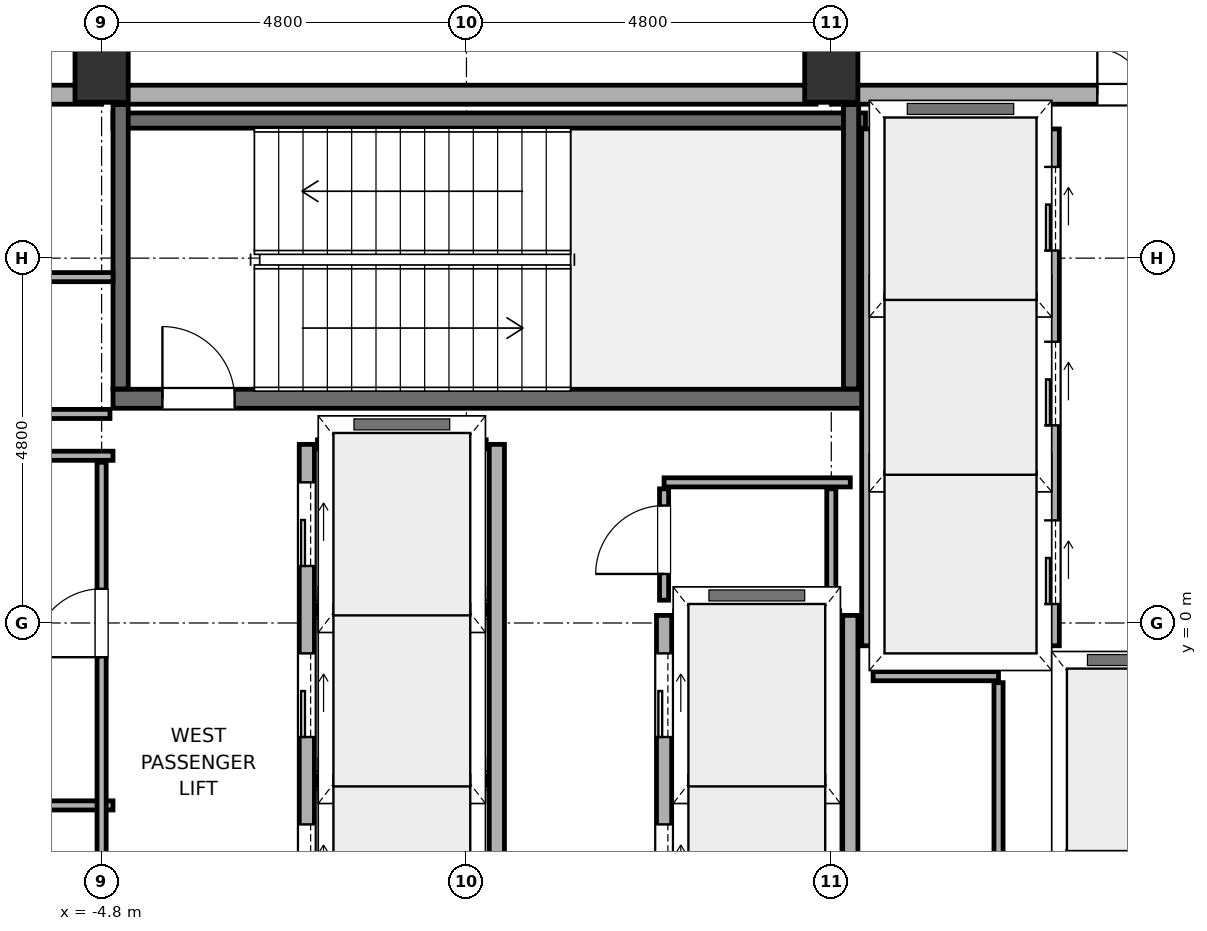
"""IFC4 building model, lengths in metres.
Left out: names, types, materials, properties, quantities, classifications, styles, units other than length and angle.
Written with IfcOpenShell. Run it as: python <this file> out.ifc"""

import sys

from ifc_helpers import new_model, si_unit, direction, frame, frame_2d, origin, origin_2d, place, context, subcontext, project, spatial, rectangle, hollow_rectangle, extrude, element, fill, save


model = new_model("IFC4")
c1 = context("Model", 3, precision=1e-05, world=origin(), true_north=direction((0.0, 1.0)))
c2 = subcontext(c1, "Body", "Model", "MODEL_VIEW")
j1 = project(units=[si_unit("LENGTHUNIT", "METRE"), si_unit("PLANEANGLEUNIT", "RADIAN")], contexts=[c1])
p1 = place(None, origin())
s1 = spatial("IfcSite", under=j1, at=p1, CompositionType="ELEMENT")
p2 = place(p1, origin())
s2 = spatial("IfcBuilding", under=s1, at=p2, CompositionType="ELEMENT")
p3 = place(p2, frame((0.0, 0.0, 180.3)))
s3 = spatial("IfcBuildingStorey", under=s2, at=p3, CompositionType="ELEMENT", Elevation=180.3)
for number, where, z_axis, x_axis in (
    (1, (-4.8, 7.2, 0.0), (0.0, 0.0, 1.0), (1.0, 0.0, 0.0)),
    (2, (4.8, 7.2, 0.0), (0.0, 0.0, 1.0), (1.0, 0.0, 0.0)),
):
    element("IfcColumn", number, at=place(p3, frame(where, z_axis=z_axis, x_axis=x_axis)), inside=s3, PredefinedType="COLUMN", context=c2, shape_type="SweptSolid", body=[
        extrude(hollow_rectangle(XDim=0.7, YDim=0.7, WallThickness=0.032, at=origin_2d()), origin(), (0.0, 0.0, 1.0), 5.2),
    ])
p4 = place(p3, frame((-14.2, 6.95, 0.0), z_axis=(0.0, 0.0, 1.0), x_axis=(1.0, 0.0, 0.0)))
e3 = element("IfcWall", 3, at=p4, inside=s3, PredefinedType="SOLIDWALL", context=c2, shape_type="SweptSolid", body=[
    extrude(rectangle(XDim=9.4, YDim=0.25, at=frame_2d((4.7, 0.0))), origin(), (0.0, 0.0, 1.0), 3.55),
])
p5 = place(p4, frame((4.9, 0.0, 0.0)))
e4 = element("IfcOpeningElement", 4, at=p5, cuts=e3, PredefinedType="OPENING", context=c2, shape_type="SweptSolid", body=[
    extrude(rectangle(XDim=1.0, YDim=2.15, at=frame_2d((0.5, 1.075))), frame((0.0, 0.14, 0.0), z_axis=(0.0, -1.0, 0.0), x_axis=(1.0, 0.0, 0.0)), (0.0, 0.0, 1.0), 0.28),
])
p6 = place(p3, frame((-4.6, 6.95, 0.0), z_axis=(0.0, 0.0, 1.0), x_axis=(1.0, 0.0, 0.0)))
e5 = element("IfcWall", 5, at=p6, inside=s3, PredefinedType="SOLIDWALL", context=c2, shape_type="SweptSolid", body=[
    extrude(rectangle(XDim=9.2, YDim=0.25, at=frame_2d((4.6, 0.0))), origin(), (0.0, 0.0, 1.0), 3.55),
])
p7 = place(p3, frame((4.8, 6.95, 0.0), z_axis=(0.0, 0.0, 1.0), x_axis=(1.0, 0.0, 0.0)))
e6 = element("IfcWall", 6, at=p7, inside=s3, PredefinedType="SOLIDWALL", context=c2, shape_type="SweptSolid", body=[
    extrude(rectangle(XDim=9.4, YDim=0.25, at=frame_2d((4.7, 0.0))), origin(), (0.0, 0.0, 1.0), 3.55),
])
p8 = place(p7, frame((3.5, 0.0, 0.0)))
e7 = element("IfcOpeningElement", 7, at=p8, cuts=e6, PredefinedType="OPENING", context=c2, shape_type="SweptSolid", body=[
    extrude(rectangle(XDim=1.2, YDim=2.2, at=frame_2d((0.6, 1.1))), frame((0.0, 0.14, 0.0), z_axis=(0.0, -1.0, 0.0), x_axis=(1.0, 0.0, 0.0)), (0.0, 0.0, 1.0), 0.28),
])
p9 = place(p3, frame((-4.65, 2.95, -0.22), z_axis=(0.0, 0.0, 1.0), x_axis=(1.0, 0.0, 0.0)))
e8 = element("IfcWall", 8, at=p9, inside=s3, PredefinedType="SOLIDWALL", context=c2, shape_type="SweptSolid", body=[
    extrude(rectangle(XDim=9.9, YDim=0.25, at=frame_2d((4.95, 0.0))), origin(), (0.0, 0.0, 1.0), 5.17),
])
p10 = place(p9, frame((0.65, 0.0, 0.22)))
e9 = element("IfcOpeningElement", 9, at=p10, cuts=e8, PredefinedType="OPENING", context=c2, shape_type="SweptSolid", body=[
    extrude(rectangle(XDim=0.95, YDim=2.15, at=frame_2d((0.475, 1.075))), frame((0.0, 0.14, 0.0), z_axis=(0.0, -1.0, 0.0), x_axis=(1.0, 0.0, 0.0)), (0.0, 0.0, 1.0), 0.28),
])
p11 = place(p3, frame((-4.65, 6.61, -0.22), z_axis=(0.0, 0.0, 1.0), x_axis=(1.0, 0.0, 0.0)))
e10 = element("IfcWall", 10, at=p11, inside=s3, PredefinedType="SOLIDWALL", context=c2, shape_type="SweptSolid", body=[
    extrude(rectangle(XDim=9.9, YDim=0.2, at=frame_2d((4.95, 0.0))), origin(), (0.0, 0.0, 1.0), 5.17),
])
for number, where, z_axis, x_axis in (
    (11, (-4.55, 3.08, -0.22), (0.0, 0.0, 1.0), (0.0, 1.0, 0.0)),
    (12, (5.06, 3.08, -0.22), (0.0, 0.0, 1.0), (0.0, 1.0, 0.0)),
):
    element("IfcWall", number, at=place(p3, frame(where, z_axis=z_axis, x_axis=x_axis)), inside=s3, PredefinedType="SOLIDWALL", context=c2, shape_type="SweptSolid", body=[
        extrude(rectangle(XDim=3.74, YDim=0.2, at=frame_2d((1.87, 0.0))), origin(), (0.0, 0.0, 1.0), 5.17),
    ])
p12 = place(p3, frame((-2.1, -6.5, 0.0), z_axis=(0.0, 0.0, 1.0), x_axis=(0.0, 1.0, 0.0)))
e13 = element("IfcWall", 13, at=p12, inside=s3, PredefinedType="SOLIDWALL", context=c2, shape_type="SweptSolid", body=[
    extrude(rectangle(XDim=8.85, YDim=0.2, at=frame_2d((4.425, 0.0))), origin(), (0.0, 0.0, 1.0), 4.95),
])
p13 = place(p12, frame((0.5, 0.0, 0.0)))
e14 = element("IfcOpeningElement", 14, at=p13, cuts=e13, PredefinedType="OPENING", context=c2, shape_type="SweptSolid", body=[
    extrude(rectangle(XDim=1.1, YDim=2.2, at=frame_2d((0.55, 1.1))), frame((0.0, 0.115, 0.0), z_axis=(0.0, -1.0, 0.0), x_axis=(1.0, 0.0, 0.0)), (0.0, 0.0, 1.0), 0.23),
])
p14 = place(p12, frame((2.75, 0.0, 0.0)))
e15 = element("IfcOpeningElement", 15, at=p14, cuts=e13, PredefinedType="OPENING", context=c2, shape_type="SweptSolid", body=[
    extrude(rectangle(XDim=1.1, YDim=2.2, at=frame_2d((0.55, 1.1))), frame((0.0, 0.115, 0.0), z_axis=(0.0, -1.0, 0.0), x_axis=(1.0, 0.0, 0.0)), (0.0, 0.0, 1.0), 0.23),
])
p15 = place(p12, frame((5.0, 0.0, 0.0)))
e16 = element("IfcOpeningElement", 16, at=p15, cuts=e13, PredefinedType="OPENING", context=c2, shape_type="SweptSolid", body=[
    extrude(rectangle(XDim=1.1, YDim=2.2, at=frame_2d((0.55, 1.1))), frame((0.0, 0.115, 0.0), z_axis=(0.0, -1.0, 0.0), x_axis=(1.0, 0.0, 0.0)), (0.0, 0.0, 1.0), 0.23),
])
p16 = place(p12, frame((7.25, 0.0, 0.0)))
e17 = element("IfcOpeningElement", 17, at=p16, cuts=e13, PredefinedType="OPENING", context=c2, shape_type="SweptSolid", body=[
    extrude(rectangle(XDim=1.1, YDim=2.2, at=frame_2d((0.55, 1.1))), frame((0.0, 0.115, 0.0), z_axis=(0.0, -1.0, 0.0), x_axis=(1.0, 0.0, 0.0)), (0.0, 0.0, 1.0), 0.23),
])
p17 = place(p3, frame((0.4, -6.5, 0.0), z_axis=(0.0, 0.0, 1.0), x_axis=(0.0, 1.0, 0.0)))
e18 = element("IfcWall", 18, at=p17, inside=s3, PredefinedType="SOLIDWALL", context=c2, shape_type="SweptSolid", body=[
    extrude(rectangle(XDim=8.85, YDim=0.2, at=frame_2d((4.425, 0.0))), origin(), (0.0, 0.0, 1.0), 4.95),
])
for number, where, z_axis, x_axis in (
    (19, (-1.96, -2.075, 0.0), (0.0, 0.0, 1.0), (1.0, 0.0, 0.0)),
    (20, (-1.96, 0.175, 0.0), (0.0, 0.0, 1.0), (1.0, 0.0, 0.0)),
    (21, (-1.96, 2.35, 0.0), (0.0, 0.0, 1.0), (1.0, 0.0, 0.0)),
):
    element("IfcWall", number, at=place(p3, frame(where, z_axis=z_axis, x_axis=x_axis)), inside=s3, PredefinedType="PARTITIONING", context=c2, shape_type="SweptSolid", body=[
        extrude(rectangle(XDim=2.22, YDim=0.12, at=frame_2d((1.11, 0.0))), origin(), (0.0, 0.0, 1.0), 4.95),
    ])
p18 = place(p3, frame((2.6, -6.5, 0.0), z_axis=(0.0, 0.0, 1.0), x_axis=(0.0, 1.0, 0.0)))
e22 = element("IfcWall", 22, at=p18, inside=s3, PredefinedType="SOLIDWALL", context=c2, shape_type="SweptSolid", body=[
    extrude(rectangle(XDim=6.6, YDim=0.2, at=frame_2d((3.3, 0.0))), origin(), (0.0, 0.0, 1.0), 4.95),
])
p19 = place(p18, frame((0.5, 0.0, 0.0)))
e23 = element("IfcOpeningElement", 23, at=p19, cuts=e22, PredefinedType="OPENING", context=c2, shape_type="SweptSolid", body=[
    extrude(rectangle(XDim=1.1, YDim=2.2, at=frame_2d((0.55, 1.1))), frame((0.0, 0.115, 0.0), z_axis=(0.0, -1.0, 0.0), x_axis=(1.0, 0.0, 0.0)), (0.0, 0.0, 1.0), 0.23),
])
p20 = place(p18, frame((2.75, 0.0, 0.0)))
e24 = element("IfcOpeningElement", 24, at=p20, cuts=e22, PredefinedType="OPENING", context=c2, shape_type="SweptSolid", body=[
    extrude(rectangle(XDim=1.1, YDim=2.2, at=frame_2d((0.55, 1.1))), frame((0.0, 0.115, 0.0), z_axis=(0.0, -1.0, 0.0), x_axis=(1.0, 0.0, 0.0)), (0.0, 0.0, 1.0), 0.23),
])
p21 = place(p18, frame((5.0, 0.0, 0.0)))
e25 = element("IfcOpeningElement", 25, at=p21, cuts=e22, PredefinedType="OPENING", context=c2, shape_type="SweptSolid", body=[
    extrude(rectangle(XDim=1.1, YDim=2.2, at=frame_2d((0.55, 1.1))), frame((0.0, 0.115, 0.0), z_axis=(0.0, -1.0, 0.0), x_axis=(1.0, 0.0, 0.0)), (0.0, 0.0, 1.0), 0.23),
])
p22 = place(p3, frame((5.05, -6.5, 0.0), z_axis=(0.0, 0.0, 1.0), x_axis=(0.0, 1.0, 0.0)))
e26 = element("IfcWall", 26, at=p22, inside=s3, PredefinedType="SOLIDWALL", context=c2, shape_type="SweptSolid", body=[
    extrude(rectangle(XDim=6.6, YDim=0.2, at=frame_2d((3.3, 0.0))), origin(), (0.0, 0.0, 1.0), 4.95),
])
for number, where, z_axis, x_axis in (
    (27, (2.74, -2.075, 0.0), (0.0, 0.0, 1.0), (1.0, 0.0, 0.0)),
    (28, (2.74, 0.1, 0.0), (0.0, 0.0, 1.0), (1.0, 0.0, 0.0)),
):
    element("IfcWall", number, at=place(p3, frame(where, z_axis=z_axis, x_axis=x_axis)), inside=s3, PredefinedType="PARTITIONING", context=c2, shape_type="SweptSolid", body=[
        extrude(rectangle(XDim=2.17, YDim=0.12, at=frame_2d((1.085, 0.0))), origin(), (0.0, 0.0, 1.0), 4.95),
    ])
p23 = place(p3, frame((7.7, -0.3, 0.0), z_axis=(0.0, 0.0, 1.0), x_axis=(0.0, 1.0, 0.0)))
e29 = element("IfcWall", 29, at=p23, inside=s3, PredefinedType="SOLIDWALL", context=c2, shape_type="SweptSolid", body=[
    extrude(rectangle(XDim=6.8, YDim=0.2, at=frame_2d((3.4, 0.0))), origin(), (0.0, 0.0, 1.0), 4.95),
])
p24 = place(p23, frame((0.55, 0.0, 0.0)))
e30 = element("IfcOpeningElement", 30, at=p24, cuts=e29, PredefinedType="OPENING", context=c2, shape_type="SweptSolid", body=[
    extrude(rectangle(XDim=1.1, YDim=2.2, at=frame_2d((0.55, 1.1))), frame((0.0, 0.115, 0.0), z_axis=(0.0, -1.0, 0.0), x_axis=(1.0, 0.0, 0.0)), (0.0, 0.0, 1.0), 0.23),
])
p25 = place(p23, frame((2.9, 0.0, 0.0)))
e31 = element("IfcOpeningElement", 31, at=p25, cuts=e29, PredefinedType="OPENING", context=c2, shape_type="SweptSolid", body=[
    extrude(rectangle(XDim=1.1, YDim=2.2, at=frame_2d((0.55, 1.1))), frame((0.0, 0.115, 0.0), z_axis=(0.0, -1.0, 0.0), x_axis=(1.0, 0.0, 0.0)), (0.0, 0.0, 1.0), 0.23),
])
p26 = place(p23, frame((5.2, 0.0, 0.0)))
e32 = element("IfcOpeningElement", 32, at=p26, cuts=e29, PredefinedType="OPENING", context=c2, shape_type="SweptSolid", body=[
    extrude(rectangle(XDim=1.1, YDim=2.2, at=frame_2d((0.55, 1.1))), frame((0.0, 0.115, 0.0), z_axis=(0.0, -1.0, 0.0), x_axis=(1.0, 0.0, 0.0)), (0.0, 0.0, 1.0), 0.23),
])
p27 = place(p3, frame((5.3, -0.3, 0.0), z_axis=(0.0, 0.0, 1.0), x_axis=(0.0, 1.0, 0.0)))
e33 = element("IfcWall", 33, at=p27, inside=s3, PredefinedType="SOLIDWALL", context=c2, shape_type="SweptSolid", body=[
    extrude(rectangle(XDim=6.8, YDim=0.2, at=frame_2d((3.4, 0.0))), origin(), (0.0, 0.0, 1.0), 4.95),
])
for number, where, z_axis, x_axis in (
    (34, (5.44, -0.3, 0.0), (0.0, 0.0, 1.0), (1.0, 0.0, 0.0)),
    (35, (5.44, 1.975, 0.0), (0.0, 0.0, 1.0), (1.0, 0.0, 0.0)),
    (36, (5.44, 4.325, 0.0), (0.0, 0.0, 1.0), (1.0, 0.0, 0.0)),
    (37, (5.44, 6.5, 0.0), (0.0, 0.0, 1.0), (1.0, 0.0, 0.0)),
):
    element("IfcWall", number, at=place(p3, frame(where, z_axis=z_axis, x_axis=x_axis)), inside=s3, PredefinedType="PARTITIONING", context=c2, shape_type="SweptSolid", body=[
        extrude(rectangle(XDim=2.12, YDim=0.12, at=frame_2d((1.06, 0.0))), origin(), (0.0, 0.0, 1.0), 4.95),
    ])
p28 = place(p3, frame((7.88, -0.5, 0.0), z_axis=(0.0, 0.0, 1.0), x_axis=(1.0, 0.0, 0.0)))
e38 = element("IfcWall", 38, at=p28, inside=s3, PredefinedType="SOLIDWALL", context=c2, shape_type="SweptSolid", body=[
    extrude(rectangle(XDim=2.04, YDim=0.2, at=frame_2d((1.02, 0.0))), origin(), (0.0, 0.0, 1.0), 4.95),
])
p29 = place(p3, frame((7.8, -2.96, 0.0), z_axis=(0.0, 0.0, 1.0), x_axis=(0.0, 1.0, 0.0)))
e39 = element("IfcWall", 39, at=p29, inside=s3, PredefinedType="PARTITIONING", context=c2, shape_type="SweptSolid", body=[
    extrude(rectangle(XDim=2.32, YDim=0.12, at=frame_2d((1.16, 0.0))), origin(), (0.0, 0.0, 1.0), 4.95),
])
p30 = place(p3, frame((-7.0, -2.4, 0.0), z_axis=(0.0, 0.0, 1.0), x_axis=(1.0, 0.0, 0.0)))
e40 = element("IfcWall", 40, at=p30, inside=s3, PredefinedType="PARTITIONING", context=c2, shape_type="SweptSolid", body=[
    extrude(rectangle(XDim=2.35, YDim=0.12, at=frame_2d((1.175, 0.0))), origin(), (0.0, 0.0, 1.0), 4.95),
])
p31 = place(p3, frame((5.35, -0.7, 0.0), z_axis=(0.0, 0.0, 1.0), x_axis=(1.0, 0.0, 0.0)))
e41 = element("IfcWall", 41, at=p31, inside=s3, PredefinedType="PARTITIONING", context=c2, shape_type="SweptSolid", body=[
    extrude(rectangle(XDim=1.65, YDim=0.12, at=frame_2d((0.825, 0.0))), origin(), (0.0, 0.0, 1.0), 4.95),
])
p32 = place(p3, frame((2.6, 1.85, 0.0), z_axis=(0.0, 0.0, 1.0), x_axis=(1.0, 0.0, 0.0)))
e42 = element("IfcWall", 42, at=p32, inside=s3, PredefinedType="PARTITIONING", context=c2, shape_type="SweptSolid", body=[
    extrude(rectangle(XDim=2.45, YDim=0.12, at=frame_2d((1.225, 0.0))), origin(), (0.0, 0.0, 1.0), 4.95),
])
p33 = place(p3, frame((-7.0, 2.2, 0.0), z_axis=(0.0, 0.0, 1.0), x_axis=(1.0, 0.0, 0.0)))
e43 = element("IfcWall", 43, at=p33, inside=s3, PredefinedType="PARTITIONING", context=c2, shape_type="SweptSolid", body=[
    extrude(rectangle(XDim=2.35, YDim=0.12, at=frame_2d((1.175, 0.0))), origin(), (0.0, 0.0, 1.0), 4.95),
])
p34 = place(p3, frame((-7.0, 2.75, 0.0), z_axis=(0.0, 0.0, 1.0), x_axis=(1.0, 0.0, 0.0)))
e44 = element("IfcWall", 44, at=p34, inside=s3, PredefinedType="PARTITIONING", context=c2, shape_type="SweptSolid", body=[
    extrude(rectangle(XDim=2.31, YDim=0.12, at=frame_2d((1.155, 0.0))), origin(), (0.0, 0.0, 1.0), 4.95),
])
p35 = place(p3, frame((-7.0, 4.55, 0.0), z_axis=(0.0, 0.0, 1.0), x_axis=(1.0, 0.0, 0.0)))
e45 = element("IfcWall", 45, at=p35, inside=s3, PredefinedType="PARTITIONING", context=c2, shape_type="SweptSolid", body=[
    extrude(rectangle(XDim=2.35, YDim=0.12, at=frame_2d((1.175, 0.0))), origin(), (0.0, 0.0, 1.0), 4.95),
])
p36 = place(p3, frame((-4.8, -6.415, 0.0), z_axis=(0.0, 0.0, 1.0), x_axis=(0.0, 1.0, 0.0)))
e46 = element("IfcWall", 46, at=p36, inside=s3, PredefinedType="PARTITIONING", context=c2, shape_type="SweptSolid", body=[
    extrude(rectangle(XDim=8.53, YDim=0.12, at=frame_2d((4.265, 0.0))), origin(), (0.0, 0.0, 1.0), 4.95),
])
p37 = place(p36, frame((1.465, 0.0, 0.0)))
e47 = element("IfcOpeningElement", 47, at=p37, cuts=e46, PredefinedType="OPENING", context=c2, shape_type="SweptSolid", body=[
    extrude(rectangle(XDim=0.9, YDim=2.1, at=frame_2d((0.45, 1.05))), frame((0.0, 0.075, 0.0), z_axis=(0.0, -1.0, 0.0), x_axis=(1.0, 0.0, 0.0)), (0.0, 0.0, 1.0), 0.15),
])
p38 = place(p36, frame((5.965, 0.0, 0.0)))
e48 = element("IfcOpeningElement", 48, at=p38, cuts=e46, PredefinedType="OPENING", context=c2, shape_type="SweptSolid", body=[
    extrude(rectangle(XDim=0.9, YDim=2.1, at=frame_2d((0.45, 1.05))), frame((0.0, 0.075, 0.0), z_axis=(0.0, -1.0, 0.0), x_axis=(1.0, 0.0, 0.0)), (0.0, 0.0, 1.0), 0.15),
])
p39 = place(p3, frame((2.6, 0.3, 0.0), z_axis=(0.0, 0.0, 1.0), x_axis=(0.0, 1.0, 0.0)))
e49 = element("IfcWall", 49, at=p39, inside=s3, PredefinedType="PARTITIONING", context=c2, shape_type="SweptSolid", body=[
    extrude(rectangle(XDim=1.465, YDim=0.12, at=frame_2d((0.732, 0.0))), origin(), (0.0, 0.0, 1.0), 4.95),
])
p40 = place(p39, frame((0.345, 0.0, 0.0)))
e50 = element("IfcOpeningElement", 50, at=p40, cuts=e49, PredefinedType="OPENING", context=c2, shape_type="SweptSolid", body=[
    extrude(rectangle(XDim=0.9, YDim=2.1, at=frame_2d((0.45, 1.05))), frame((0.0, 0.075, 0.0), z_axis=(0.0, -1.0, 0.0), x_axis=(1.0, 0.0, 0.0)), (0.0, 0.0, 1.0), 0.15),
])
p41 = place(p3, frame((4.8, 0.3, 0.0), z_axis=(0.0, 0.0, 1.0), x_axis=(0.0, 1.0, 0.0)))
e51 = element("IfcWall", 51, at=p41, inside=s3, PredefinedType="PARTITIONING", context=c2, shape_type="SweptSolid", body=[
    extrude(rectangle(XDim=1.465, YDim=0.12, at=frame_2d((0.732, 0.0))), origin(), (0.0, 0.0, 1.0), 4.95),
])
p42 = place(p3, frame((7.0, -3.11, 0.0), z_axis=(0.0, 0.0, 1.0), x_axis=(0.0, 1.0, 0.0)))
e52 = element("IfcWall", 52, at=p42, inside=s3, PredefinedType="PARTITIONING", context=c2, shape_type="SweptSolid", body=[
    extrude(rectangle(XDim=2.325, YDim=0.12, at=frame_2d((1.163, 0.0))), origin(), (0.0, 0.0, 1.0), 4.95),
])
p43 = place(p8, origin())
e53 = element("IfcDoor", 53, at=p43, inside=s3, OperationType="DOUBLE_DOOR_SINGLE_SWING", PredefinedType="DOOR", context=c2, shape_type="SweptSolid", body=[
    extrude(rectangle(XDim=1.2, YDim=2.2, at=frame_2d((0.6, 1.1))), frame((0.0, 0.025, 0.0), z_axis=(0.0, -1.0, 0.0), x_axis=(1.0, 0.0, 0.0)), (0.0, 0.0, 1.0), 0.05),
])
fill(e7, e53)
p44 = place(p10, origin())
e54 = element("IfcDoor", 54, at=p44, inside=s3, OperationType="SINGLE_SWING_RIGHT", PredefinedType="DOOR", context=c2, shape_type="SweptSolid", body=[
    extrude(rectangle(XDim=0.95, YDim=2.15, at=frame_2d((0.475, 1.075))), frame((0.0, 0.025, 0.0), z_axis=(0.0, -1.0, 0.0), x_axis=(1.0, 0.0, 0.0)), (0.0, 0.0, 1.0), 0.05),
])
fill(e9, e54)
p45 = place(p14, origin())
e55 = element("IfcDoor", 55, at=p45, inside=s3, OperationType="SLIDING_TO_LEFT", PredefinedType="DOOR", context=c2, shape_type="SweptSolid", body=[
    extrude(rectangle(XDim=1.1, YDim=2.2, at=frame_2d((0.55, 1.1))), frame((0.0, 0.025, 0.0), z_axis=(0.0, -1.0, 0.0), x_axis=(1.0, 0.0, 0.0)), (0.0, 0.0, 1.0), 0.05),
])
fill(e15, e55)
p46 = place(p15, origin())
e56 = element("IfcDoor", 56, at=p46, inside=s3, OperationType="SLIDING_TO_LEFT", PredefinedType="DOOR", context=c2, shape_type="SweptSolid", body=[
    extrude(rectangle(XDim=1.1, YDim=2.2, at=frame_2d((0.55, 1.1))), frame((0.0, 0.025, 0.0), z_axis=(0.0, -1.0, 0.0), x_axis=(1.0, 0.0, 0.0)), (0.0, 0.0, 1.0), 0.05),
])
fill(e16, e56)
p47 = place(p16, origin())
e57 = element("IfcDoor", 57, at=p47, inside=s3, OperationType="SLIDING_TO_LEFT", PredefinedType="DOOR", context=c2, shape_type="SweptSolid", body=[
    extrude(rectangle(XDim=1.1, YDim=2.2, at=frame_2d((0.55, 1.1))), frame((0.0, 0.025, 0.0), z_axis=(0.0, -1.0, 0.0), x_axis=(1.0, 0.0, 0.0)), (0.0, 0.0, 1.0), 0.05),
])
fill(e17, e57)
p48 = place(p20, origin())
e58 = element("IfcDoor", 58, at=p48, inside=s3, OperationType="SLIDING_TO_LEFT", PredefinedType="DOOR", context=c2, shape_type="SweptSolid", body=[
    extrude(rectangle(XDim=1.1, YDim=2.2, at=frame_2d((0.55, 1.1))), frame((0.0, 0.025, 0.0), z_axis=(0.0, -1.0, 0.0), x_axis=(1.0, 0.0, 0.0)), (0.0, 0.0, 1.0), 0.05),
])
fill(e24, e58)
p49 = place(p21, origin())
e59 = element("IfcDoor", 59, at=p49, inside=s3, OperationType="SLIDING_TO_LEFT", PredefinedType="DOOR", context=c2, shape_type="SweptSolid", body=[
    extrude(rectangle(XDim=1.1, YDim=2.2, at=frame_2d((0.55, 1.1))), frame((0.0, 0.025, 0.0), z_axis=(0.0, -1.0, 0.0), x_axis=(1.0, 0.0, 0.0)), (0.0, 0.0, 1.0), 0.05),
])
fill(e25, e59)
p50 = place(p24, origin())
e60 = element("IfcDoor", 60, at=p50, inside=s3, OperationType="SLIDING_TO_LEFT", PredefinedType="DOOR", context=c2, shape_type="SweptSolid", body=[
    extrude(rectangle(XDim=1.1, YDim=2.2, at=frame_2d((0.55, 1.1))), frame((0.0, 0.025, 0.0), z_axis=(0.0, -1.0, 0.0), x_axis=(1.0, 0.0, 0.0)), (0.0, 0.0, 1.0), 0.05),
])
fill(e30, e60)
p51 = place(p25, origin())
e61 = element("IfcDoor", 61, at=p51, inside=s3, OperationType="SLIDING_TO_LEFT", PredefinedType="DOOR", context=c2, shape_type="SweptSolid", body=[
    extrude(rectangle(XDim=1.1, YDim=2.2, at=frame_2d((0.55, 1.1))), frame((0.0, 0.025, 0.0), z_axis=(0.0, -1.0, 0.0), x_axis=(1.0, 0.0, 0.0)), (0.0, 0.0, 1.0), 0.05),
])
fill(e31, e61)
p52 = place(p26, origin())
e62 = element("IfcDoor", 62, at=p52, inside=s3, OperationType="SLIDING_TO_LEFT", PredefinedType="DOOR", context=c2, shape_type="SweptSolid", body=[
    extrude(rectangle(XDim=1.1, YDim=2.2, at=frame_2d((0.55, 1.1))), frame((0.0, 0.025, 0.0), z_axis=(0.0, -1.0, 0.0), x_axis=(1.0, 0.0, 0.0)), (0.0, 0.0, 1.0), 0.05),
])
fill(e32, e62)
p53 = place(p38, origin())
e63 = element("IfcDoor", 63, at=p53, inside=s3, OperationType="SINGLE_SWING_RIGHT", PredefinedType="DOOR", context=c2, shape_type="SweptSolid", body=[
    extrude(rectangle(XDim=0.9, YDim=2.1, at=frame_2d((0.45, 1.05))), frame((0.0, 0.025, 0.0), z_axis=(0.0, -1.0, 0.0), x_axis=(1.0, 0.0, 0.0)), (0.0, 0.0, 1.0), 0.05),
])
fill(e48, e63)
p54 = place(p40, origin())
e64 = element("IfcDoor", 64, at=p54, inside=s3, OperationType="SINGLE_SWING_RIGHT", PredefinedType="DOOR", context=c2, shape_type="SweptSolid", body=[
    extrude(rectangle(XDim=0.9, YDim=2.1, at=frame_2d((0.45, 1.05))), frame((0.0, 0.025, 0.0), z_axis=(0.0, -1.0, 0.0), x_axis=(1.0, 0.0, 0.0)), (0.0, 0.0, 1.0), 0.05),
])
fill(e50, e64)
save(model, sys.argv[1])
